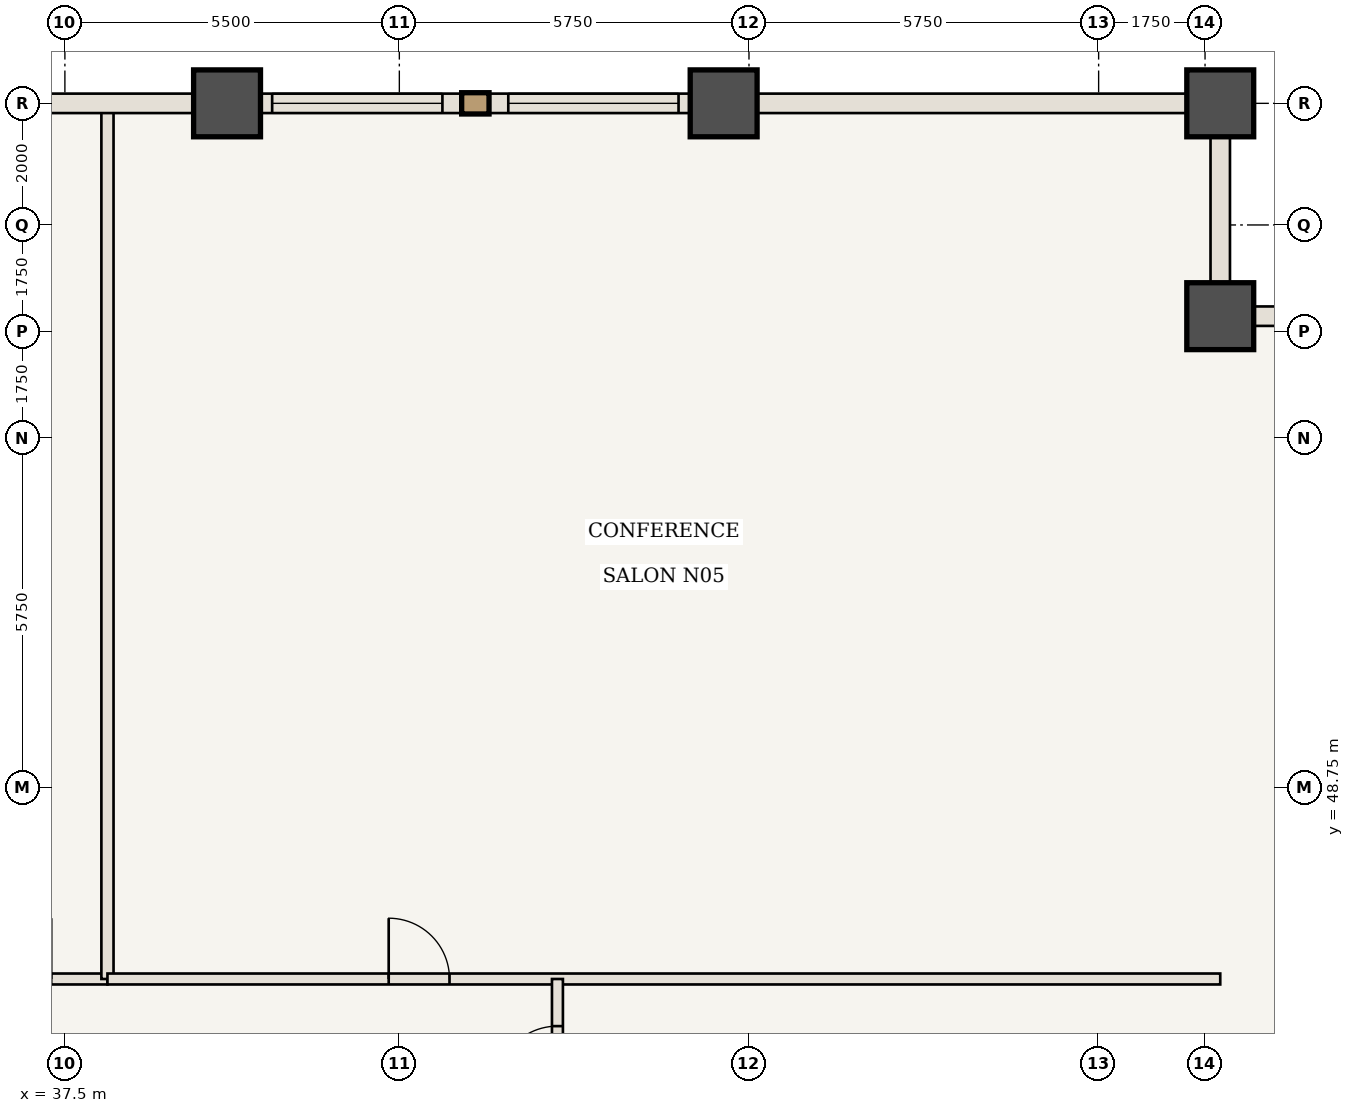
"""IFC4 building model, lengths in metres.
Left out: names, types, materials, properties, quantities, classifications, styles, units other than length and angle.
Written with IfcOpenShell. Run it as: python <this file> out.ifc"""

import sys

from ifc_helpers import new_model, si_unit, direction, frame, frame_2d, origin, origin_2d, place, context, subcontext, project, spatial, rectangle, extrude, element, fill, save


model = new_model("IFC4")
c1 = context("Model", 3, precision=1e-05, world=origin(), true_north=direction((0.0, 1.0)))
c2 = subcontext(c1, "Body", "Model", "MODEL_VIEW")
j1 = project(units=[si_unit("LENGTHUNIT", "METRE"), si_unit("PLANEANGLEUNIT", "RADIAN")], contexts=[c1])
p1 = place(None, origin())
s1 = spatial("IfcSite", under=j1, at=p1, CompositionType="ELEMENT")
p2 = place(p1, origin())
s2 = spatial("IfcBuilding", under=s1, at=p2, CompositionType="ELEMENT")
p3 = place(p2, frame((0.0, 0.0, 42.35)))
s3 = spatial("IfcBuildingStorey", under=s2, at=p3, CompositionType="ELEMENT", Elevation=42.35)
for number, where, z_axis, x_axis in (
    (1, (56.5, 56.5, 0.0), (0.0, 0.0, 1.0), (1.0, 0.0, 0.0)),
    (2, (56.5, 60.0, 0.0), (0.0, 0.0, 1.0), (1.0, 0.0, 0.0)),
    (3, (40.167, 60.0, 0.0), (0.0, 0.0, 1.0), (1.0, 0.0, 0.0)),
    (4, (48.333, 60.0, 0.0), (0.0, 0.0, 1.0), (1.0, 0.0, 0.0)),
):
    element("IfcColumn", number, at=place(p3, frame(where, z_axis=z_axis, x_axis=x_axis)), inside=s3, PredefinedType="COLUMN", context=c2, shape_type="SweptSolid", body=[
        extrude(rectangle(XDim=1.1, YDim=1.1, at=origin_2d()), origin(), (0.0, 0.0, 1.0), 3.5),
    ])
p4 = place(p3, frame((33.5, 45.6, 0.0), z_axis=(0.0, 0.0, 1.0), x_axis=(1.0, 0.0, 0.0)))
e5 = element("IfcWall", 5, at=p4, inside=s3, PredefinedType="STANDARD", context=c2, shape_type="SweptSolid", body=[
    extrude(rectangle(XDim=4.7, YDim=0.18, at=frame_2d((2.35, 0.0))), origin(), (0.0, 0.0, 1.0), 3.32),
])
p5 = place(p4, frame((2.775, 0.0, 0.0)))
e6 = element("IfcOpeningElement", 6, at=p5, cuts=e5, PredefinedType="OPENING", context=c2, shape_type="SweptSolid", body=[
    extrude(rectangle(XDim=1.0, YDim=2.15, at=frame_2d((0.5, 1.075))), frame((0.0, 0.1, 0.0), z_axis=(0.0, -1.0, 0.0), x_axis=(1.0, 0.0, 0.0)), (0.0, 0.0, 1.0), 0.2),
])
p6 = place(p3, frame((38.2, 45.6, 0.0), z_axis=(0.0, 0.0, 1.0), x_axis=(0.0, 1.0, 0.0)))
e7 = element("IfcWall", 7, at=p6, inside=s3, PredefinedType="STANDARD", context=c2, shape_type="SweptSolid", body=[
    extrude(rectangle(XDim=14.34, YDim=0.2, at=frame_2d((7.17, 0.0))), origin(), (0.0, 0.0, 1.0), 3.32),
])
p7 = place(p3, frame((38.2, 45.6, 0.0), z_axis=(0.0, 0.0, 1.0), x_axis=(1.0, 0.0, 0.0)))
e8 = element("IfcWall", 8, at=p7, inside=s3, PredefinedType="STANDARD", context=c2, shape_type="SweptSolid", body=[
    extrude(rectangle(XDim=18.3, YDim=0.18, at=frame_2d((9.15, 0.0))), origin(), (0.0, 0.0, 1.0), 3.32),
])
p8 = place(p7, frame((4.625, 0.0, 0.0)))
e9 = element("IfcOpeningElement", 9, at=p8, cuts=e8, PredefinedType="OPENING", context=c2, shape_type="SweptSolid", body=[
    extrude(rectangle(XDim=1.0, YDim=2.15, at=frame_2d((0.5, 1.075))), frame((0.0, 0.1, 0.0), z_axis=(0.0, -1.0, 0.0), x_axis=(1.0, 0.0, 0.0)), (0.0, 0.0, 1.0), 0.2),
])
p9 = place(p3, frame((45.6, 41.2, 0.0), z_axis=(0.0, 0.0, 1.0), x_axis=(0.0, 1.0, 0.0)))
e10 = element("IfcWall", 10, at=p9, inside=s3, PredefinedType="STANDARD", context=c2, shape_type="SweptSolid", body=[
    extrude(rectangle(XDim=4.4, YDim=0.18, at=frame_2d((2.2, 0.0))), origin(), (0.0, 0.0, 1.0), 3.32),
])
p10 = place(p9, frame((2.625, 0.0, 0.0)))
e11 = element("IfcOpeningElement", 11, at=p10, cuts=e10, PredefinedType="OPENING", context=c2, shape_type="SweptSolid", body=[
    extrude(rectangle(XDim=1.0, YDim=2.15, at=frame_2d((0.5, 1.075))), frame((0.0, 0.1, 0.0), z_axis=(0.0, -1.0, 0.0), x_axis=(1.0, 0.0, 0.0)), (0.0, 0.0, 1.0), 0.2),
])
p11 = place(p3, frame((32.0, 60.0, 0.0), z_axis=(0.0, 0.0, 1.0), x_axis=(1.0, 0.0, 0.0)))
e12 = element("IfcWall", 12, at=p11, inside=s3, PredefinedType="USERDEFINED", context=c2, shape_type="SweptSolid", body=[
    extrude(rectangle(XDim=8.167, YDim=0.32, at=frame_2d((4.083, 0.0))), origin(), (0.0, 0.0, 1.0), 2.52),
])
p12 = place(p11, frame((2.65, 0.0, 0.85)))
e13 = element("IfcOpeningElement", 13, at=p12, cuts=e12, PredefinedType="OPENING", context=c2, shape_type="SweptSolid", body=[
    extrude(rectangle(XDim=2.4, YDim=1.47, at=frame_2d((1.2, 0.735))), frame((0.0, 0.17, 0.0), z_axis=(0.0, -1.0, 0.0), x_axis=(1.0, 0.0, 0.0)), (0.0, 0.0, 1.0), 0.34),
])
p13 = place(p3, frame((40.167, 60.0, 0.0), z_axis=(0.0, 0.0, 1.0), x_axis=(1.0, 0.0, 0.0)))
e14 = element("IfcWall", 14, at=p13, inside=s3, PredefinedType="USERDEFINED", context=c2, shape_type="SweptSolid", body=[
    extrude(rectangle(XDim=8.167, YDim=0.32, at=frame_2d((4.083, 0.0))), origin(), (0.0, 0.0, 1.0), 2.52),
])
p14 = place(p13, frame((0.742, 0.0, 0.85)))
e15 = element("IfcOpeningElement", 15, at=p14, cuts=e14, PredefinedType="OPENING", context=c2, shape_type="SweptSolid", body=[
    extrude(rectangle(XDim=2.8, YDim=1.47, at=frame_2d((1.4, 0.735))), frame((0.0, 0.17, 0.0), z_axis=(0.0, -1.0, 0.0), x_axis=(1.0, 0.0, 0.0)), (0.0, 0.0, 1.0), 0.34),
])
p15 = place(p13, frame((4.625, 0.0, 0.85)))
e16 = element("IfcOpeningElement", 16, at=p15, cuts=e14, PredefinedType="OPENING", context=c2, shape_type="SweptSolid", body=[
    extrude(rectangle(XDim=2.8, YDim=1.47, at=frame_2d((1.4, 0.735))), frame((0.0, 0.17, 0.0), z_axis=(0.0, -1.0, 0.0), x_axis=(1.0, 0.0, 0.0)), (0.0, 0.0, 1.0), 0.34),
])
p16 = place(p3, frame((48.333, 60.0, 0.0), z_axis=(0.0, 0.0, 1.0), x_axis=(1.0, 0.0, 0.0)))
e17 = element("IfcWall", 17, at=p16, inside=s3, PredefinedType="USERDEFINED", context=c2, shape_type="SweptSolid", body=[
    extrude(rectangle(XDim=8.167, YDim=0.32, at=frame_2d((4.083, 0.0))), origin(), (0.0, 0.0, 1.0), 2.52),
])
for number, where, z_axis, x_axis in (
    (18, (56.5, 56.5, 0.0), (0.0, 0.0, 1.0), (1.0, 0.0, 0.0)),
    (19, (56.5, 60.0, 0.0), (0.0, 0.0, 1.0), (0.0, -1.0, 0.0)),
):
    element("IfcWall", number, at=place(p3, frame(where, z_axis=z_axis, x_axis=x_axis)), inside=s3, PredefinedType="USERDEFINED", context=c2, shape_type="SweptSolid", body=[
        extrude(rectangle(XDim=3.5, YDim=0.32, at=frame_2d((1.75, 0.0))), origin(), (0.0, 0.0, 1.0), 2.52),
    ])
p17 = place(p8, origin())
e20 = element("IfcDoor", 20, at=p17, inside=s3, OperationType="SINGLE_SWING_LEFT", PredefinedType="DOOR", context=c2, shape_type="SweptSolid", body=[
    extrude(rectangle(XDim=1.0, YDim=2.15, at=frame_2d((0.5, 1.075))), frame((0.0, 0.025, 0.0), z_axis=(0.0, -1.0, 0.0), x_axis=(1.0, 0.0, 0.0)), (0.0, 0.0, 1.0), 0.05),
])
fill(e9, e20)
p18 = place(p10, origin())
e21 = element("IfcDoor", 21, at=p18, inside=s3, OperationType="SINGLE_SWING_LEFT", PredefinedType="DOOR", context=c2, shape_type="SweptSolid", body=[
    extrude(rectangle(XDim=1.0, YDim=2.15, at=frame_2d((0.5, 1.075))), frame((0.0, 0.025, 0.0), z_axis=(0.0, -1.0, 0.0), x_axis=(1.0, 0.0, 0.0)), (0.0, 0.0, 1.0), 0.05),
])
fill(e11, e21)
p19 = place(p14, origin())
e22 = element("IfcWindow", 22, at=p19, inside=s3, PartitioningType="SINGLE_PANEL", PredefinedType="WINDOW", context=c2, shape_type="SweptSolid", body=[
    extrude(rectangle(XDim=2.8, YDim=1.47, at=frame_2d((1.4, 0.735))), frame((0.0, 0.03, 0.0), z_axis=(0.0, -1.0, 0.0), x_axis=(1.0, 0.0, 0.0)), (0.0, 0.0, 1.0), 0.06),
])
fill(e15, e22)
p20 = place(p15, origin())
e23 = element("IfcWindow", 23, at=p20, inside=s3, PartitioningType="SINGLE_PANEL", PredefinedType="WINDOW", context=c2, shape_type="SweptSolid", body=[
    extrude(rectangle(XDim=2.8, YDim=1.47, at=frame_2d((1.4, 0.735))), frame((0.0, 0.03, 0.0), z_axis=(0.0, -1.0, 0.0), x_axis=(1.0, 0.0, 0.0)), (0.0, 0.0, 1.0), 0.06),
])
fill(e16, e23)
save(model, sys.argv[1])
